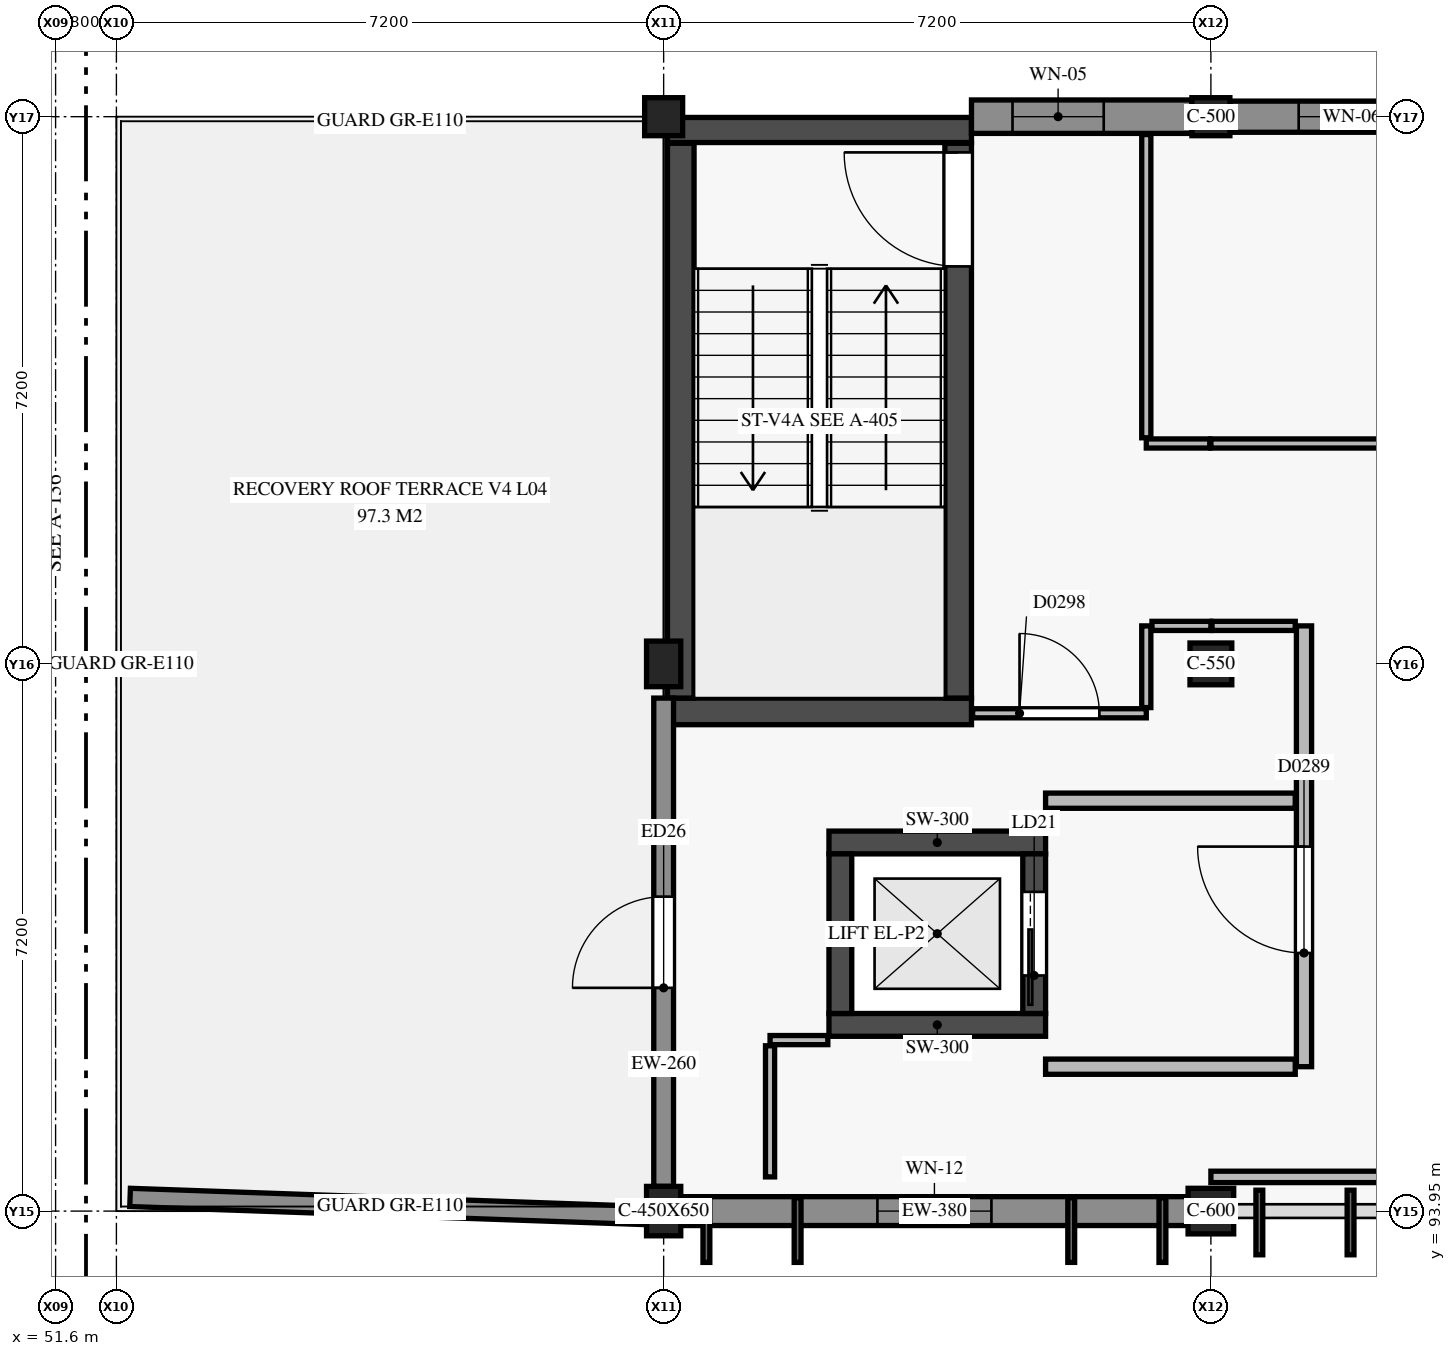
"""IFC4 building model, lengths in metres.
Left out: names, types, materials, properties, quantities, classifications, styles, units other than length and angle.
Written with IfcOpenShell. Run it as: python <this file> out.ifc"""

import sys

from ifc_helpers import new_model, si_unit, direction, frame, frame_2d, origin, origin_2d, place, context, subcontext, project, spatial, rectangle, circle, extrude, element, fill, save


model = new_model("IFC4")
c1 = context("Model", 3, precision=1e-05, world=origin(), true_north=direction((0.0, 1.0)))
c2 = subcontext(c1, "Body", "Model", "MODEL_VIEW")
j1 = project(units=[si_unit("LENGTHUNIT", "METRE"), si_unit("PLANEANGLEUNIT", "RADIAN")], contexts=[c1])
p1 = place(None, origin())
s1 = spatial("IfcSite", under=j1, at=p1, CompositionType="ELEMENT")
p2 = place(p1, origin())
s2 = spatial("IfcBuilding", under=s1, at=p2, CompositionType="ELEMENT")
p3 = place(p2, frame((0.0, 0.0, 17.4)))
s3 = spatial("IfcBuildingStorey", under=s2, at=p3, CompositionType="ELEMENT", Elevation=17.4)
p4 = place(p3, frame((59.6, 93.95, 0.0), z_axis=(0.0, 0.0, 1.0), x_axis=(1.0, 0.0, 0.0)))
e1 = element("IfcColumn", 1, at=p4, inside=s3, PredefinedType="COLUMN", context=c2, shape_type="SweptSolid", body=[
    extrude(rectangle(XDim=0.45, YDim=0.65, at=origin_2d()), origin(), (0.0, 0.0, 1.0), 4.2),
])
p5 = place(p3, frame((59.6, 101.15, 0.0), z_axis=(0.0, 0.0, 1.0), x_axis=(1.0, 0.0, 0.0)))
e2 = element("IfcColumn", 2, at=p5, inside=s3, PredefinedType="COLUMN", context=c2, shape_type="SweptSolid", body=[
    extrude(rectangle(XDim=0.45, YDim=0.6, at=origin_2d()), origin(), (0.0, 0.0, 1.0), 4.2),
])
p6 = place(p3, frame((59.6, 108.35, 0.0), z_axis=(0.0, 0.0, 1.0), x_axis=(1.0, 0.0, 0.0)))
e3 = element("IfcColumn", 3, at=p6, inside=s3, PredefinedType="COLUMN", context=c2, shape_type="SweptSolid", body=[
    extrude(circle(Radius=0.25, at=origin_2d()), origin(), (0.0, 0.0, 1.0), 4.2),
])
p7 = place(p3, frame((66.8, 93.95, 0.0), z_axis=(0.0, 0.0, 1.0), x_axis=(1.0, 0.0, 0.0)))
e4 = element("IfcColumn", 4, at=p7, inside=s3, PredefinedType="COLUMN", context=c2, shape_type="SweptSolid", body=[
    extrude(rectangle(XDim=0.6, YDim=0.6, at=origin_2d()), origin(), (0.0, 0.0, 1.0), 4.2),
])
p8 = place(p3, frame((66.8, 101.15, 0.0), z_axis=(0.0, 0.0, 1.0), x_axis=(1.0, 0.0, 0.0)))
e5 = element("IfcColumn", 5, at=p8, inside=s3, PredefinedType="COLUMN", context=c2, shape_type="SweptSolid", body=[
    extrude(rectangle(XDim=0.55, YDim=0.55, at=origin_2d()), origin(), (0.0, 0.0, 1.0), 4.2),
])
p9 = place(p3, frame((66.8, 108.35, 0.0), z_axis=(0.0, 0.0, 1.0), x_axis=(1.0, 0.0, 0.0)))
e6 = element("IfcColumn", 6, at=p9, inside=s3, PredefinedType="COLUMN", context=c2, shape_type="SweptSolid", body=[
    extrude(rectangle(XDim=0.5, YDim=0.5, at=origin_2d()), origin(), (0.0, 0.0, 1.0), 4.2),
])
p10 = place(p3, frame((59.65, 100.525, 0.0), z_axis=(0.0, 0.0, 1.0), x_axis=(1.0, 0.0, 0.0)))
e7 = element("IfcWall", 7, at=p10, inside=s3, PredefinedType="SHEAR", context=c2, shape_type="SweptSolid", body=[
    extrude(rectangle(XDim=4.0, YDim=0.35, at=frame_2d((2.0, 0.0))), origin(), (0.0, 0.0, 1.0), 3.92),
])
p11 = place(p3, frame((59.65, 108.175, 0.0), z_axis=(0.0, 0.0, 1.0), x_axis=(1.0, 0.0, 0.0)))
e8 = element("IfcWall", 8, at=p11, inside=s3, PredefinedType="SHEAR", context=c2, shape_type="SweptSolid", body=[
    extrude(rectangle(XDim=4.0, YDim=0.33, at=frame_2d((2.0, 0.0))), origin(), (0.0, 0.0, 1.0), 3.92),
])
p12 = place(p3, frame((59.825, 100.7, 0.0), z_axis=(0.0, 0.0, 1.0), x_axis=(0.0, 1.0, 0.0)))
e9 = element("IfcWall", 9, at=p12, inside=s3, PredefinedType="SHEAR", context=c2, shape_type="SweptSolid", body=[
    extrude(rectangle(XDim=7.3, YDim=0.35, at=frame_2d((3.65, 0.0))), origin(), (0.0, 0.0, 1.0), 3.92),
])
p13 = place(p3, frame((63.475, 100.7, 0.0), z_axis=(0.0, 0.0, 1.0), x_axis=(0.0, 1.0, 0.0)))
e10 = element("IfcWall", 10, at=p13, inside=s3, PredefinedType="SHEAR", context=c2, shape_type="SweptSolid", body=[
    extrude(rectangle(XDim=7.3, YDim=0.35, at=frame_2d((3.65, 0.0))), origin(), (0.0, 0.0, 1.0), 3.92),
])
p14 = place(p13, frame((5.68, 0.0, 0.0)))
e11 = element("IfcOpeningElement", 11, at=p14, cuts=e10, PredefinedType="OPENING", context=c2, shape_type="SweptSolid", body=[
    extrude(rectangle(XDim=1.5, YDim=2.15, at=frame_2d((0.75, 1.075))), frame((0.0, 0.185, 0.0), z_axis=(0.0, -1.0, 0.0), x_axis=(1.0, 0.0, 0.0)), (0.0, 0.0, 1.0), 0.37),
])
for number, where, z_axis, x_axis in (
    (12, (61.775, 96.4, 0.0), (0.0, 0.0, 1.0), (1.0, 0.0, 0.0)),
    (13, (61.775, 98.8, 0.0), (0.0, 0.0, 1.0), (1.0, 0.0, 0.0)),
):
    element("IfcWall", number, at=place(p3, frame(where, z_axis=z_axis, x_axis=x_axis)), inside=s3, PredefinedType="SHEAR", context=c2, shape_type="SweptSolid", body=[
        extrude(rectangle(XDim=2.85, YDim=0.3, at=frame_2d((1.425, 0.0))), origin(), (0.0, 0.0, 1.0), 3.92),
    ])
p15 = place(p3, frame((61.925, 96.55, 0.0), z_axis=(0.0, 0.0, 1.0), x_axis=(0.0, 1.0, 0.0)))
e14 = element("IfcWall", 14, at=p15, inside=s3, PredefinedType="SHEAR", context=c2, shape_type="SweptSolid", body=[
    extrude(rectangle(XDim=2.1, YDim=0.3, at=frame_2d((1.05, 0.0))), origin(), (0.0, 0.0, 1.0), 3.92),
])
p16 = place(p3, frame((64.475, 96.55, 0.0), z_axis=(0.0, 0.0, 1.0), x_axis=(0.0, 1.0, 0.0)))
e15 = element("IfcWall", 15, at=p16, inside=s3, PredefinedType="SHEAR", context=c2, shape_type="SweptSolid", body=[
    extrude(rectangle(XDim=2.1, YDim=0.3, at=frame_2d((1.05, 0.0))), origin(), (0.0, 0.0, 1.0), 3.92),
])
p17 = place(p16, frame((0.5, 0.0, 0.0)))
e16 = element("IfcOpeningElement", 16, at=p17, cuts=e15, PredefinedType="OPENING", context=c2, shape_type="SweptSolid", body=[
    extrude(rectangle(XDim=1.1, YDim=2.15, at=frame_2d((0.55, 1.075))), frame((0.0, 0.16, 0.0), z_axis=(0.0, -1.0, 0.0), x_axis=(1.0, 0.0, 0.0)), (0.0, 0.0, 1.0), 0.32),
])
p18 = place(p3, frame((66.5, 93.95, 0.0), z_axis=(0.0, 0.0, 1.0), x_axis=(-1.0, 0.0, 0.0)))
e17 = element("IfcWall", 17, at=p18, inside=s3, PredefinedType="USERDEFINED", context=c2, shape_type="SweptSolid", body=[
    extrude(rectangle(XDim=6.675, YDim=0.38, at=frame_2d((3.337, 0.0))), origin(), (0.0, 0.0, 1.0), 3.1),
])
p19 = place(p18, frame((2.587, 0.0, 0.9)))
e18 = element("IfcOpeningElement", 18, at=p19, cuts=e17, PredefinedType="OPENING", context=c2, shape_type="SweptSolid", body=[
    extrude(rectangle(XDim=1.5, YDim=1.5, at=frame_2d((0.75, 0.75))), frame((0.0, 0.2, 0.0), z_axis=(0.0, -1.0, 0.0), x_axis=(1.0, 0.0, 0.0)), (0.0, 0.0, 1.0), 0.4),
])
p20 = place(p3, frame((59.6, 94.275, 0.0), z_axis=(0.0, 0.0, 1.0), x_axis=(0.0, 1.0, 0.0)))
e19 = element("IfcWall", 19, at=p20, inside=s3, PredefinedType="SOLIDWALL", context=c2, shape_type="SweptSolid", body=[
    extrude(rectangle(XDim=6.425, YDim=0.26, at=frame_2d((3.212, 0.0))), origin(), (0.0, 0.0, 1.0), 3.1),
])
p21 = place(p20, frame((2.613, 0.0, 0.0)))
e20 = element("IfcOpeningElement", 20, at=p21, cuts=e19, PredefinedType="OPENING", context=c2, shape_type="SweptSolid", body=[
    extrude(rectangle(XDim=1.2, YDim=2.2, at=frame_2d((0.6, 1.1))), frame((0.0, 0.14, 0.0), z_axis=(0.0, -1.0, 0.0), x_axis=(1.0, 0.0, 0.0)), (0.0, 0.0, 1.0), 0.28),
])
p22 = place(p3, frame((63.65, 108.35, 0.0), z_axis=(0.0, 0.0, 1.0), x_axis=(1.0, 0.0, 0.0)))
e21 = element("IfcWall", 21, at=p22, inside=s3, PredefinedType="USERDEFINED", context=c2, shape_type="SweptSolid", body=[
    extrude(rectangle(XDim=2.9, YDim=0.44, at=frame_2d((1.45, 0.0))), origin(), (0.0, 0.0, 1.0), 3.1),
])
p23 = place(p22, frame((0.54, 0.0, 0.9)))
e22 = element("IfcOpeningElement", 22, at=p23, cuts=e21, PredefinedType="OPENING", context=c2, shape_type="SweptSolid", body=[
    extrude(rectangle(XDim=1.2, YDim=1.8, at=frame_2d((0.6, 0.9))), frame((0.0, 0.23, 0.0), z_axis=(0.0, -1.0, 0.0), x_axis=(1.0, 0.0, 0.0)), (0.0, 0.0, 1.0), 0.46),
])
p24 = place(p3, frame((67.05, 108.35, 0.0), z_axis=(0.0, 0.0, 1.0), x_axis=(1.0, 0.0, 0.0)))
e23 = element("IfcWall", 23, at=p24, inside=s3, PredefinedType="USERDEFINED", context=c2, shape_type="SweptSolid", body=[
    extrude(rectangle(XDim=3.21, YDim=0.41, at=frame_2d((1.605, 0.0))), origin(), (0.0, 0.0, 1.0), 3.1),
])
p25 = place(p24, frame((0.905, 0.0, 0.9)))
e24 = element("IfcOpeningElement", 24, at=p25, cuts=e23, PredefinedType="OPENING", context=c2, shape_type="SweptSolid", body=[
    extrude(rectangle(XDim=1.4, YDim=1.8, at=frame_2d((0.7, 0.9))), frame((0.0, 0.215, 0.0), z_axis=(0.0, -1.0, 0.0), x_axis=(1.0, 0.0, 0.0)), (0.0, 0.0, 1.0), 0.43),
])
p26 = place(p3, frame((52.58, 94.13, 0.0), z_axis=(0.0, 0.0, 1.0), x_axis=(0.999385015723, -0.035065515079, 0.0)))
e25 = element("IfcWall", 25, at=p26, inside=s3, PredefinedType="PARAPET", context=c2, shape_type="SweptSolid", body=[
    extrude(rectangle(XDim=6.844, YDim=0.24, at=frame_2d((3.422, 0.0))), origin(), (0.0, 0.0, 1.0), 1.12),
])
p27 = place(p3, frame((68.025, 95.85, 0.0), z_axis=(0.0, 0.0, 1.0), x_axis=(0.0, 1.0, 0.0)))
e26 = element("IfcWall", 26, at=p27, inside=s3, PredefinedType="PARTITIONING", context=c2, shape_type="SweptSolid", body=[
    extrude(rectangle(XDim=5.8, YDim=0.2, at=frame_2d((2.9, 0.0))), origin(), (0.0, 0.0, 1.0), 3.425),
])
p28 = place(p27, frame((1.496, 0.0, 0.0)))
e27 = element("IfcOpeningElement", 27, at=p28, cuts=e26, PredefinedType="OPENING", context=c2, shape_type="SweptSolid", body=[
    extrude(rectangle(XDim=1.4, YDim=2.2, at=frame_2d((0.7, 1.1))), frame((0.0, 0.11, 0.0), z_axis=(0.0, -1.0, 0.0), x_axis=(1.0, 0.0, 0.0)), (0.0, 0.0, 1.0), 0.22),
])
for number, where, z_axis, x_axis in (
    (28, (64.625, 95.85, 0.0), (0.0, 0.0, 1.0), (1.0, 0.0, 0.0)),
    (29, (64.625, 99.35, 0.0), (0.0, 0.0, 1.0), (1.0, 0.0, 0.0)),
):
    element("IfcWall", number, at=place(p3, frame(where, z_axis=z_axis, x_axis=x_axis)), inside=s3, PredefinedType="PARTITIONING", context=c2, shape_type="SweptSolid", body=[
        extrude(rectangle(XDim=3.285, YDim=0.2, at=frame_2d((1.643, 0.0))), origin(), (0.0, 0.0, 1.0), 3.325),
    ])
p29 = place(p3, frame((66.8, 94.4, 0.0), z_axis=(0.0, 0.0, 1.0), x_axis=(1.0, 0.0, 0.0)))
e30 = element("IfcWall", 30, at=p29, inside=s3, PredefinedType="PARTITIONING", context=c2, shape_type="SweptSolid", body=[
    extrude(rectangle(XDim=3.63, YDim=0.15, at=frame_2d((1.815, 0.0))), origin(), (0.0, 0.0, 1.0), 3.325),
])
p30 = place(p3, frame((66.8, 104.05, 0.0), z_axis=(0.0, 0.0, 1.0), x_axis=(1.0, 0.0, 0.0)))
e31 = element("IfcWall", 31, at=p30, inside=s3, PredefinedType="PARTITIONING", context=c2, shape_type="SweptSolid", body=[
    extrude(rectangle(XDim=3.835, YDim=0.12, at=frame_2d((1.917, 0.0))), origin(), (0.0, 0.0, 1.0), 3.325),
])
p31 = place(p3, frame((65.95, 104.05, 0.0), z_axis=(0.0, 0.0, 1.0), x_axis=(1.0, 0.0, 0.0)))
e32 = element("IfcWall", 32, at=p31, inside=s3, PredefinedType="PARTITIONING", context=c2, shape_type="SweptSolid", body=[
    extrude(rectangle(XDim=0.835, YDim=0.12, at=frame_2d((0.417, 0.0))), origin(), (0.0, 0.0, 1.0), 3.325),
])
p32 = place(p3, frame((65.95, 104.125, 0.0), z_axis=(0.0, 0.0, 1.0), x_axis=(0.0, 1.0, 0.0)))
e33 = element("IfcWall", 33, at=p32, inside=s3, PredefinedType="PARTITIONING", context=c2, shape_type="SweptSolid", body=[
    extrude(rectangle(XDim=3.99, YDim=0.12, at=frame_2d((1.995, 0.0))), origin(), (0.0, 0.0, 1.0), 3.92),
])
p33 = place(p3, frame((63.665, 100.5, 0.0), z_axis=(0.0, 0.0, 1.0), x_axis=(1.0, 0.0, 0.0)))
e34 = element("IfcWall", 34, at=p33, inside=s3, PredefinedType="PARTITIONING", context=c2, shape_type="SweptSolid", body=[
    extrude(rectangle(XDim=2.285, YDim=0.12, at=frame_2d((1.143, 0.0))), origin(), (0.0, 0.0, 1.0), 3.92),
])
p34 = place(p33, frame((0.617, 0.0, 0.0)))
e35 = element("IfcOpeningElement", 35, at=p34, cuts=e34, PredefinedType="OPENING", context=c2, shape_type="SweptSolid", body=[
    extrude(rectangle(XDim=1.05, YDim=2.15, at=frame_2d((0.525, 1.075))), frame((0.0, 0.07, 0.0), z_axis=(0.0, -1.0, 0.0), x_axis=(1.0, 0.0, 0.0)), (0.0, 0.0, 1.0), 0.14),
])
p35 = place(p3, frame((65.95, 100.575, 0.0), z_axis=(0.0, 0.0, 1.0), x_axis=(0.0, 1.0, 0.0)))
e36 = element("IfcWall", 36, at=p35, inside=s3, PredefinedType="PARTITIONING", context=c2, shape_type="SweptSolid", body=[
    extrude(rectangle(XDim=1.075, YDim=0.12, at=frame_2d((0.538, 0.0))), origin(), (0.0, 0.0, 1.0), 3.92),
])
p36 = place(p3, frame((66.025, 101.65, 0.0), z_axis=(0.0, 0.0, 1.0), x_axis=(1.0, 0.0, 0.0)))
e37 = element("IfcWall", 37, at=p36, inside=s3, PredefinedType="PARTITIONING", context=c2, shape_type="SweptSolid", body=[
    extrude(rectangle(XDim=0.775, YDim=0.12, at=frame_2d((0.388, 0.0))), origin(), (0.0, 0.0, 1.0), 3.325),
])
p37 = place(p3, frame((66.815, 101.65, 0.0), z_axis=(0.0, 0.0, 1.0), x_axis=(1.0, 0.0, 0.0)))
e38 = element("IfcWall", 38, at=p37, inside=s3, PredefinedType="PARTITIONING", context=c2, shape_type="SweptSolid", body=[
    extrude(rectangle(XDim=1.095, YDim=0.12, at=frame_2d((0.547, 0.0))), origin(), (0.0, 0.0, 1.0), 3.325),
])
p38 = place(p3, frame((61.0, 96.2, 0.0), z_axis=(0.0, 0.0, 1.0), x_axis=(1.0, 0.0, 0.0)))
e39 = element("IfcWall", 39, at=p38, inside=s3, PredefinedType="PARTITIONING", context=c2, shape_type="SweptSolid", body=[
    extrude(rectangle(XDim=0.76, YDim=0.12, at=frame_2d((0.38, 0.0))), origin(), (0.0, 0.0, 1.0), 3.485),
])
p39 = place(p3, frame((61.0, 94.4, 0.0), z_axis=(0.0, 0.0, 1.0), x_axis=(0.0, 1.0, 0.0)))
e40 = element("IfcWall", 40, at=p39, inside=s3, PredefinedType="PARTITIONING", context=c2, shape_type="SweptSolid", body=[
    extrude(rectangle(XDim=1.725, YDim=0.12, at=frame_2d((0.863, 0.0))), origin(), (0.0, 0.0, 1.0), 3.92),
])
p40 = place(p19, origin())
e41 = element("IfcWindow", 41, at=p40, inside=s3, PartitioningType="SINGLE_PANEL", PredefinedType="WINDOW", context=c2, shape_type="SweptSolid", body=[
    extrude(rectangle(XDim=1.5, YDim=1.5, at=frame_2d((0.75, 0.75))), frame((0.0, 0.03, 0.0), z_axis=(0.0, -1.0, 0.0), x_axis=(1.0, 0.0, 0.0)), (0.0, 0.0, 1.0), 0.06),
])
fill(e18, e41)
p41 = place(p21, origin())
e42 = element("IfcDoor", 42, at=p41, inside=s3, OperationType="SINGLE_SWING_LEFT", PredefinedType="DOOR", context=c2, shape_type="SweptSolid", body=[
    extrude(rectangle(XDim=1.2, YDim=2.2, at=frame_2d((0.6, 1.1))), frame((0.0, 0.025, 0.0), z_axis=(0.0, -1.0, 0.0), x_axis=(1.0, 0.0, 0.0)), (0.0, 0.0, 1.0), 0.05),
])
fill(e20, e42)
p42 = place(p23, origin())
e43 = element("IfcWindow", 43, at=p42, inside=s3, PartitioningType="SINGLE_PANEL", PredefinedType="WINDOW", context=c2, shape_type="SweptSolid", body=[
    extrude(rectangle(XDim=1.2, YDim=1.8, at=frame_2d((0.6, 0.9))), frame((0.0, 0.03, 0.0), z_axis=(0.0, -1.0, 0.0), x_axis=(1.0, 0.0, 0.0)), (0.0, 0.0, 1.0), 0.06),
])
fill(e22, e43)
p43 = place(p25, origin())
e44 = element("IfcWindow", 44, at=p43, inside=s3, PartitioningType="SINGLE_PANEL", PredefinedType="WINDOW", context=c2, shape_type="SweptSolid", body=[
    extrude(rectangle(XDim=1.4, YDim=1.8, at=frame_2d((0.7, 0.9))), frame((0.0, 0.03, 0.0), z_axis=(0.0, -1.0, 0.0), x_axis=(1.0, 0.0, 0.0)), (0.0, 0.0, 1.0), 0.06),
])
fill(e24, e44)
p44 = place(p14, origin())
e45 = element("IfcDoor", 45, at=p44, inside=s3, OperationType="SINGLE_SWING_RIGHT", PredefinedType="DOOR", context=c2, shape_type="SweptSolid", body=[
    extrude(rectangle(XDim=1.5, YDim=2.15, at=frame_2d((0.75, 1.075))), frame((0.0, 0.025, 0.0), z_axis=(0.0, -1.0, 0.0), x_axis=(1.0, 0.0, 0.0)), (0.0, 0.0, 1.0), 0.05),
])
fill(e11, e45)
p45 = place(p17, origin())
e46 = element("IfcDoor", 46, at=p45, inside=s3, OperationType="SLIDING_TO_LEFT", PredefinedType="DOOR", context=c2, shape_type="SweptSolid", body=[
    extrude(rectangle(XDim=1.1, YDim=2.15, at=frame_2d((0.55, 1.075))), frame((0.0, 0.025, 0.0), z_axis=(0.0, -1.0, 0.0), x_axis=(1.0, 0.0, 0.0)), (0.0, 0.0, 1.0), 0.05),
])
fill(e16, e46)
p46 = place(p28, origin())
e47 = element("IfcDoor", 47, at=p46, inside=s3, OperationType="SINGLE_SWING_RIGHT", PredefinedType="DOOR", context=c2, shape_type="SweptSolid", body=[
    extrude(rectangle(XDim=1.4, YDim=2.2, at=frame_2d((0.7, 1.1))), frame((0.0, 0.025, 0.0), z_axis=(0.0, -1.0, 0.0), x_axis=(1.0, 0.0, 0.0)), (0.0, 0.0, 1.0), 0.05),
])
fill(e27, e47)
p47 = place(p34, origin())
e48 = element("IfcDoor", 48, at=p47, inside=s3, OperationType="SINGLE_SWING_LEFT", PredefinedType="DOOR", context=c2, shape_type="SweptSolid", body=[
    extrude(rectangle(XDim=1.05, YDim=2.15, at=frame_2d((0.525, 1.075))), frame((0.0, 0.025, 0.0), z_axis=(0.0, -1.0, 0.0), x_axis=(1.0, 0.0, 0.0)), (0.0, 0.0, 1.0), 0.05),
])
fill(e35, e48)
save(model, sys.argv[1])
